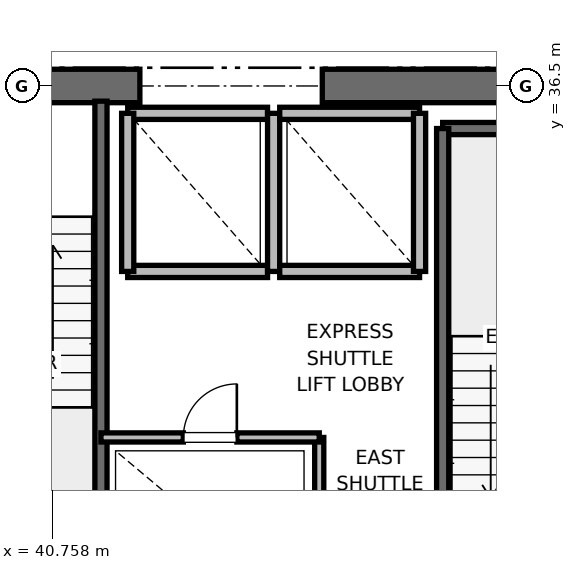
"""IFC4 building model, lengths in metres.
Left out: names, types, materials, properties, quantities, classifications, styles, units other than length and angle.
Written with IfcOpenShell. Run it as: python <this file> out.ifc"""

import sys

from ifc_helpers import new_model, si_unit, direction, frame, frame_2d, origin, place, context, subcontext, project, spatial, rectangle, extrude, element, fill, save


model = new_model("IFC4")
c1 = context("Model", 3, precision=1e-05, world=origin(), true_north=direction((0.0, 1.0)))
c2 = subcontext(c1, "Body", "Model", "MODEL_VIEW")
j1 = project(units=[si_unit("LENGTHUNIT", "METRE"), si_unit("PLANEANGLEUNIT", "RADIAN")], contexts=[c1])
p1 = place(None, origin())
s1 = spatial("IfcSite", under=j1, at=p1, CompositionType="ELEMENT")
p2 = place(p1, origin())
s2 = spatial("IfcBuilding", under=s1, at=p2, CompositionType="ELEMENT")
p3 = place(p2, frame((0.0, 0.0, 140.4)))
s3 = spatial("IfcBuildingStorey", under=s2, at=p3, CompositionType="ELEMENT", Elevation=140.4)
p4 = place(p3, frame((37.8, 36.5, 0.0), z_axis=(0.0, 0.0, 1.0), x_axis=(1.0, 0.0, 0.0)))
e1 = element("IfcWall", 1, at=p4, inside=s3, PredefinedType="SHEAR", context=c2, shape_type="SweptSolid", body=[
    extrude(rectangle(XDim=4.4, YDim=0.55, at=frame_2d((2.2, 0.0))), origin(), (0.0, 0.0, 1.0), 3.775),
])
p5 = place(p4, frame((1.65, 0.0, 0.0)))
e2 = element("IfcOpeningElement", 2, at=p5, cuts=e1, PredefinedType="OPENING", context=c2, shape_type="SweptSolid", body=[
    extrude(rectangle(XDim=1.1, YDim=2.15, at=frame_2d((0.55, 1.075))), frame((0.0, 0.275, 0.0), z_axis=(0.0, -1.0, 0.0), x_axis=(1.0, 0.0, 0.0)), (0.0, 0.0, 1.0), 0.55),
])
p6 = place(p3, frame((45.2, 36.5, 0.0), z_axis=(0.0, 0.0, 1.0), x_axis=(1.0, 0.0, 0.0)))
e3 = element("IfcWall", 3, at=p6, inside=s3, PredefinedType="SHEAR", context=c2, shape_type="SweptSolid", body=[
    extrude(rectangle(XDim=5.8, YDim=0.55, at=frame_2d((2.9, 0.0))), origin(), (0.0, 0.0, 1.0), 3.775),
])
p7 = place(p3, frame((47.18, 35.8, 0.0), z_axis=(0.0, 0.0, 1.0), x_axis=(1.0, 0.0, 0.0)))
e4 = element("IfcWall", 4, at=p7, inside=s3, PredefinedType="SOLIDWALL", context=c2, shape_type="SweptSolid", body=[
    extrude(rectangle(XDim=3.12, YDim=0.2, at=frame_2d((1.56, 0.0))), origin(), (0.0, 0.0, 1.0), 3.775),
])
p8 = place(p3, frame((47.18, 27.62, 0.0), z_axis=(0.0, 0.0, 1.0), x_axis=(0.0, 1.0, 0.0)))
e5 = element("IfcWall", 5, at=p8, inside=s3, PredefinedType="SOLIDWALL", context=c2, shape_type="SweptSolid", body=[
    extrude(rectangle(XDim=8.18, YDim=0.2, at=frame_2d((4.09, 0.0))), origin(), (0.0, 0.0, 1.0), 3.775),
])
p9 = place(p3, frame((41.56, 27.68, 0.0), z_axis=(0.0, 0.0, 1.0), x_axis=(0.0, 1.0, 0.0)))
e6 = element("IfcWall", 6, at=p9, inside=s3, PredefinedType="SOLIDWALL", context=c2, shape_type="SweptSolid", body=[
    extrude(rectangle(XDim=8.57, YDim=0.2, at=frame_2d((4.285, 0.0))), origin(), (0.0, 0.0, 1.0), 3.775),
])
p10 = place(p3, frame((42.0, 33.45, 0.0), z_axis=(0.0, 0.0, 1.0), x_axis=(1.0, 0.0, 0.0)))
e7 = element("IfcWall", 7, at=p10, inside=s3, PredefinedType="SOLIDWALL", context=c2, shape_type="SweptSolid", body=[
    extrude(rectangle(XDim=2.3, YDim=0.2, at=frame_2d((1.15, 0.0))), origin(), (0.0, 0.0, 1.0), 3.775),
])
p11 = place(p3, frame((44.3, 36.05, 0.0), z_axis=(0.0, 0.0, 1.0), x_axis=(-1.0, 0.0, 0.0)))
e8 = element("IfcWall", 8, at=p11, inside=s3, PredefinedType="SOLIDWALL", context=c2, shape_type="SweptSolid", body=[
    extrude(rectangle(XDim=2.3, YDim=0.2, at=frame_2d((1.15, 0.0))), origin(), (0.0, 0.0, 1.0), 2.755),
])
for number, where, z_axis, x_axis in (
    (9, (42.0, 36.05, 0.0), (0.0, 0.0, 1.0), (0.0, -1.0, 0.0)),
    (10, (44.4, 33.45, 0.0), (0.0, 0.0, 1.0), (0.0, 1.0, 0.0)),
):
    element("IfcWall", number, at=place(p3, frame(where, z_axis=z_axis, x_axis=x_axis)), inside=s3, PredefinedType="SOLIDWALL", context=c2, shape_type="SweptSolid", body=[
        extrude(rectangle(XDim=2.6, YDim=0.2, at=frame_2d((1.3, 0.0))), origin(), (0.0, 0.0, 1.0), 2.755),
    ])
p12 = place(p3, frame((44.5, 33.45, 0.0), z_axis=(0.0, 0.0, 1.0), x_axis=(1.0, 0.0, 0.0)))
e11 = element("IfcWall", 11, at=p12, inside=s3, PredefinedType="SOLIDWALL", context=c2, shape_type="SweptSolid", body=[
    extrude(rectangle(XDim=2.3, YDim=0.2, at=frame_2d((1.15, 0.0))), origin(), (0.0, 0.0, 1.0), 3.775),
])
p13 = place(p3, frame((46.8, 36.05, 0.0), z_axis=(0.0, 0.0, 1.0), x_axis=(-1.0, 0.0, 0.0)))
e12 = element("IfcWall", 12, at=p13, inside=s3, PredefinedType="SOLIDWALL", context=c2, shape_type="SweptSolid", body=[
    extrude(rectangle(XDim=2.3, YDim=0.2, at=frame_2d((1.15, 0.0))), origin(), (0.0, 0.0, 1.0), 2.755),
])
p14 = place(p3, frame((46.8, 33.45, 0.0), z_axis=(0.0, 0.0, 1.0), x_axis=(0.0, 1.0, 0.0)))
e13 = element("IfcWall", 13, at=p14, inside=s3, PredefinedType="SOLIDWALL", context=c2, shape_type="SweptSolid", body=[
    extrude(rectangle(XDim=2.6, YDim=0.2, at=frame_2d((1.3, 0.0))), origin(), (0.0, 0.0, 1.0), 3.775),
])
p15 = place(p3, frame((45.15, 27.62, 0.0), z_axis=(0.0, 0.0, 1.0), x_axis=(0.0, 1.0, 0.0)))
e14 = element("IfcWall", 14, at=p15, inside=s3, PredefinedType="PARTITIONING", context=c2, shape_type="SweptSolid", body=[
    extrude(rectangle(XDim=3.1, YDim=0.15, at=frame_2d((1.55, 0.0))), origin(), (0.0, 0.0, 1.0), 2.85),
])
p16 = place(p3, frame((41.56, 30.72, 0.0), z_axis=(0.0, 0.0, 1.0), x_axis=(1.0, 0.0, 0.0)))
e15 = element("IfcWall", 15, at=p16, inside=s3, PredefinedType="PARTITIONING", context=c2, shape_type="SweptSolid", body=[
    extrude(rectangle(XDim=3.59, YDim=0.15, at=frame_2d((1.795, 0.0))), origin(), (0.0, 0.0, 1.0), 2.85),
])
p17 = place(p16, frame((1.355, 0.0, 0.0)))
e16 = element("IfcOpeningElement", 16, at=p17, cuts=e15, PredefinedType="OPENING", context=c2, shape_type="SweptSolid", body=[
    extrude(rectangle(XDim=0.88, YDim=2.1, at=frame_2d((0.44, 1.05))), frame((0.0, 0.075, 0.0), z_axis=(0.0, -1.0, 0.0), x_axis=(1.0, 0.0, 0.0)), (0.0, 0.0, 1.0), 0.15),
])
p18 = place(p17, origin())
e17 = element("IfcDoor", 17, at=p18, inside=s3, OperationType="SINGLE_SWING_RIGHT", PredefinedType="DOOR", context=c2, shape_type="SweptSolid", body=[
    extrude(rectangle(XDim=0.88, YDim=2.1, at=frame_2d((0.44, 1.05))), frame((0.0, 0.025, 0.0), z_axis=(0.0, -1.0, 0.0), x_axis=(1.0, 0.0, 0.0)), (0.0, 0.0, 1.0), 0.05),
])
fill(e16, e17)
save(model, sys.argv[1])
